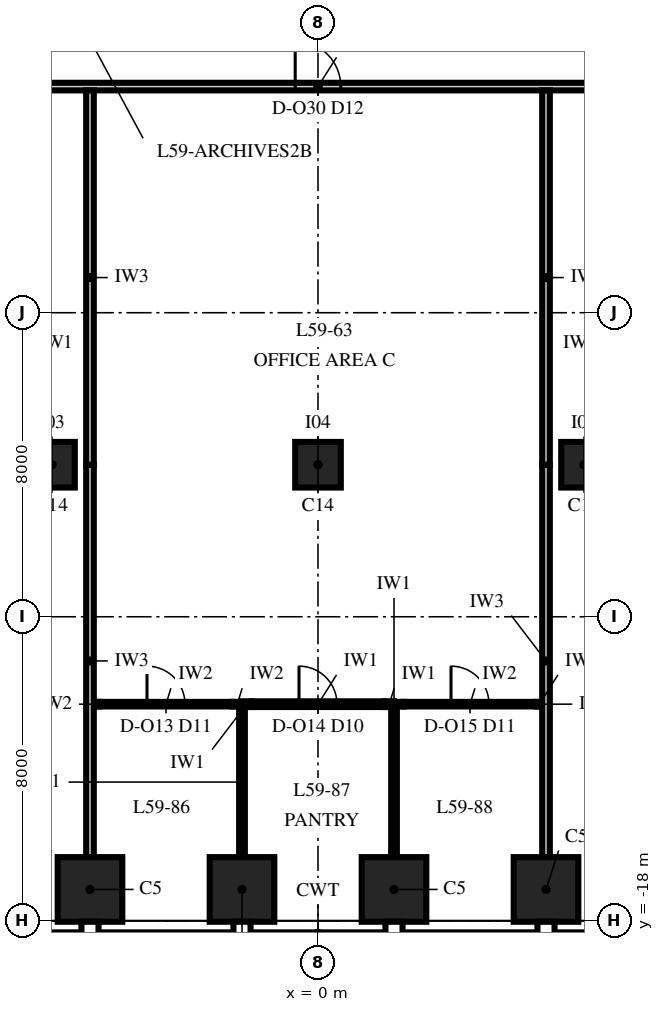
"""IFC4 building model, lengths in metres.
Left out: names, types, materials, properties, quantities, classifications, styles, units other than length and angle.
Written with IfcOpenShell. Run it as: python <this file> out.ifc"""

import sys

from ifc_helpers import new_model, si_unit, direction, frame, frame_2d, origin, origin_2d, place, context, subcontext, project, spatial, rectangle, extrude, element, fill, save


model = new_model("IFC4")
c1 = context("Model", 3, precision=1e-05, world=origin(), true_north=direction((0.0, 1.0)))
c2 = subcontext(c1, "Body", "Model", "MODEL_VIEW")
j1 = project(units=[si_unit("LENGTHUNIT", "METRE"), si_unit("PLANEANGLEUNIT", "RADIAN")], contexts=[c1])
p1 = place(None, origin())
s1 = spatial("IfcSite", under=j1, at=p1, CompositionType="ELEMENT")
p2 = place(p1, origin())
s2 = spatial("IfcBuilding", under=s1, at=p2, CompositionType="ELEMENT")
p3 = place(p2, frame((0.0, 0.0, 256.0)))
s3 = spatial("IfcBuildingStorey", under=s2, at=p3, CompositionType="ELEMENT", Elevation=256.0)
for number, where, z_axis, x_axis in (
    (1, (-6.0, -17.175, 0.0), (0.0, 0.0, 1.0), (1.0, 0.0, 0.0)),
    (2, (-2.0, -17.175, 0.0), (0.0, 0.0, 1.0), (1.0, 0.0, 0.0)),
    (3, (2.0, -17.175, 0.0), (0.0, 0.0, 1.0), (1.0, 0.0, 0.0)),
    (4, (6.0, -17.175, 0.0), (0.0, 0.0, 1.0), (1.0, 0.0, 0.0)),
):
    element("IfcColumn", number, at=place(p3, frame(where, z_axis=z_axis, x_axis=x_axis)), inside=s3, PredefinedType="COLUMN", context=c2, shape_type="SweptSolid", body=[
        extrude(rectangle(XDim=1.7, YDim=1.7, at=origin_2d()), origin(), (0.0, 0.0, 1.0), 3.75),
    ])
for number, where, z_axis, x_axis in (
    (5, (-7.0, -6.0, 0.0), (0.0, 0.0, 1.0), (1.0, 0.0, 0.0)),
    (6, (0.0, -6.0, 0.0), (0.0, 0.0, 1.0), (1.0, 0.0, 0.0)),
    (7, (7.0, -6.0, 0.0), (0.0, 0.0, 1.0), (1.0, 0.0, 0.0)),
):
    element("IfcColumn", number, at=place(p3, frame(where, z_axis=z_axis, x_axis=x_axis)), inside=s3, PredefinedType="COLUMN", context=c2, shape_type="SweptSolid", body=[
        extrude(rectangle(XDim=1.2, YDim=1.2, at=origin_2d()), origin(), (0.0, 0.0, 1.0), 4.0),
    ])
p4 = place(p3, frame((-5.9, -12.3, 0.0), z_axis=(0.0, 0.0, 1.0), x_axis=(1.0, 0.0, 0.0)))
e8 = element("IfcWall", 8, at=p4, inside=s3, PredefinedType="PARTITIONING", context=c2, shape_type="SweptSolid", body=[
    extrude(rectangle(XDim=0.15, YDim=0.12, at=frame_2d((0.075, 0.0))), origin(), (0.0, 0.0, 1.0), 2.15),
])
p5 = place(p3, frame((-5.75, -12.3, 0.0), z_axis=(0.0, 0.0, 1.0), x_axis=(1.0, 0.0, 0.0)))
e9 = element("IfcWall", 9, at=p5, inside=s3, PredefinedType="PARTITIONING", context=c2, shape_type="SweptSolid", body=[
    extrude(rectangle(XDim=3.5, YDim=0.12, at=frame_2d((1.75, 0.0))), origin(), (0.0, 0.0, 1.0), 3.85),
])
p6 = place(p5, frame((1.25, 0.0, 0.0)))
e10 = element("IfcOpeningElement", 10, at=p6, cuts=e9, PredefinedType="OPENING", context=c2, shape_type="SweptSolid", body=[
    extrude(rectangle(XDim=1.0, YDim=2.4, at=frame_2d((0.5, 1.2))), frame((0.0, 0.075, 0.0), z_axis=(0.0, -1.0, 0.0), x_axis=(1.0, 0.0, 0.0)), (0.0, 0.0, 1.0), 0.15),
])
p7 = place(p3, frame((-2.25, -12.3, 0.0), z_axis=(0.0, 0.0, 1.0), x_axis=(1.0, 0.0, 0.0)))
e11 = element("IfcWall", 11, at=p7, inside=s3, PredefinedType="PARTITIONING", context=c2, shape_type="SweptSolid", body=[
    extrude(rectangle(XDim=0.25, YDim=0.12, at=frame_2d((0.125, 0.0))), origin(), (0.0, 0.0, 1.0), 2.15),
])
p8 = place(p3, frame((-2.0, -12.3, 0.0), z_axis=(0.0, 0.0, 1.0), x_axis=(1.0, 0.0, 0.0)))
e12 = element("IfcWall", 12, at=p8, inside=s3, PredefinedType="PARTITIONING", context=c2, shape_type="SweptSolid", body=[
    extrude(rectangle(XDim=0.25, YDim=0.15, at=frame_2d((0.125, 0.0))), origin(), (0.0, 0.0, 1.0), 2.15),
])
p9 = place(p3, frame((-1.75, -12.3, 0.0), z_axis=(0.0, 0.0, 1.0), x_axis=(1.0, 0.0, 0.0)))
e13 = element("IfcWall", 13, at=p9, inside=s3, PredefinedType="PARTITIONING", context=c2, shape_type="SweptSolid", body=[
    extrude(rectangle(XDim=3.5, YDim=0.15, at=frame_2d((1.75, 0.0))), origin(), (0.0, 0.0, 1.0), 3.85),
])
p10 = place(p9, frame((1.25, 0.0, 0.0)))
e14 = element("IfcOpeningElement", 14, at=p10, cuts=e13, PredefinedType="OPENING", context=c2, shape_type="SweptSolid", body=[
    extrude(rectangle(XDim=1.0, YDim=2.3, at=frame_2d((0.5, 1.15))), frame((0.0, 0.09, 0.0), z_axis=(0.0, -1.0, 0.0), x_axis=(1.0, 0.0, 0.0)), (0.0, 0.0, 1.0), 0.18),
])
p11 = place(p3, frame((1.75, -12.3, 0.0), z_axis=(0.0, 0.0, 1.0), x_axis=(1.0, 0.0, 0.0)))
e15 = element("IfcWall", 15, at=p11, inside=s3, PredefinedType="PARTITIONING", context=c2, shape_type="SweptSolid", body=[
    extrude(rectangle(XDim=0.25, YDim=0.15, at=frame_2d((0.125, 0.0))), origin(), (0.0, 0.0, 1.0), 2.15),
])
p12 = place(p3, frame((2.0, -12.3, 0.0), z_axis=(0.0, 0.0, 1.0), x_axis=(1.0, 0.0, 0.0)))
e16 = element("IfcWall", 16, at=p12, inside=s3, PredefinedType="PARTITIONING", context=c2, shape_type="SweptSolid", body=[
    extrude(rectangle(XDim=0.25, YDim=0.12, at=frame_2d((0.125, 0.0))), origin(), (0.0, 0.0, 1.0), 2.15),
])
p13 = place(p3, frame((2.25, -12.3, 0.0), z_axis=(0.0, 0.0, 1.0), x_axis=(1.0, 0.0, 0.0)))
e17 = element("IfcWall", 17, at=p13, inside=s3, PredefinedType="PARTITIONING", context=c2, shape_type="SweptSolid", body=[
    extrude(rectangle(XDim=3.5, YDim=0.12, at=frame_2d((1.75, 0.0))), origin(), (0.0, 0.0, 1.0), 3.85),
])
p14 = place(p13, frame((1.25, 0.0, 0.0)))
e18 = element("IfcOpeningElement", 18, at=p14, cuts=e17, PredefinedType="OPENING", context=c2, shape_type="SweptSolid", body=[
    extrude(rectangle(XDim=1.0, YDim=2.4, at=frame_2d((0.5, 1.2))), frame((0.0, 0.075, 0.0), z_axis=(0.0, -1.0, 0.0), x_axis=(1.0, 0.0, 0.0)), (0.0, 0.0, 1.0), 0.15),
])
p15 = place(p3, frame((5.75, -12.3, 0.0), z_axis=(0.0, 0.0, 1.0), x_axis=(1.0, 0.0, 0.0)))
e19 = element("IfcWall", 19, at=p15, inside=s3, PredefinedType="PARTITIONING", context=c2, shape_type="SweptSolid", body=[
    extrude(rectangle(XDim=0.15, YDim=0.12, at=frame_2d((0.075, 0.0))), origin(), (0.0, 0.0, 1.0), 2.15),
])
p16 = place(p3, frame((-15.95, 3.95, 0.0), z_axis=(0.0, 0.0, 1.0), x_axis=(1.0, 0.0, 0.0)))
e20 = element("IfcWall", 20, at=p16, inside=s3, PredefinedType="PARTITIONING", context=c2, shape_type="SweptSolid", body=[
    extrude(rectangle(XDim=31.9, YDim=0.2, at=frame_2d((15.95, 0.0))), origin(), (0.0, 0.0, 1.0), 3.23),
])
p17 = place(p16, frame((3.35, 0.0, 0.0)))
e21 = element("IfcOpeningElement", 21, at=p17, cuts=e20, PredefinedType="OPENING", context=c2, shape_type="SweptSolid", body=[
    extrude(rectangle(XDim=1.2, YDim=2.4, at=frame_2d((0.6, 1.2))), frame((0.0, 0.115, 0.0), z_axis=(0.0, -1.0, 0.0), x_axis=(1.0, 0.0, 0.0)), (0.0, 0.0, 1.0), 0.23),
])
p18 = place(p16, frame((27.35, 0.0, 0.0)))
e22 = element("IfcOpeningElement", 22, at=p18, cuts=e20, PredefinedType="OPENING", context=c2, shape_type="SweptSolid", body=[
    extrude(rectangle(XDim=1.2, YDim=2.4, at=frame_2d((0.6, 1.2))), frame((0.0, 0.115, 0.0), z_axis=(0.0, -1.0, 0.0), x_axis=(1.0, 0.0, 0.0)), (0.0, 0.0, 1.0), 0.23),
])
p19 = place(p16, frame((15.35, 0.0, 0.0)))
e23 = element("IfcOpeningElement", 23, at=p19, cuts=e20, PredefinedType="OPENING", context=c2, shape_type="SweptSolid", body=[
    extrude(rectangle(XDim=1.2, YDim=2.4, at=frame_2d((0.6, 1.2))), frame((0.0, 0.115, 0.0), z_axis=(0.0, -1.0, 0.0), x_axis=(1.0, 0.0, 0.0)), (0.0, 0.0, 1.0), 0.23),
])
p20 = place(p3, frame((-6.0, -16.325, 0.0), z_axis=(0.0, 0.0, 1.0), x_axis=(0.0, 1.0, 0.0)))
e24 = element("IfcWall", 24, at=p20, inside=s3, PredefinedType="PARTITIONING", context=c2, shape_type="SweptSolid", body=[
    extrude(rectangle(XDim=10.325, YDim=0.2, at=frame_2d((5.163, 0.0))), origin(), (0.0, 0.0, 1.0), 2.15),
])
p21 = place(p3, frame((-6.0, -6.0, 0.0), z_axis=(0.0, 0.0, 1.0), x_axis=(0.0, 1.0, 0.0)))
e25 = element("IfcWall", 25, at=p21, inside=s3, PredefinedType="PARTITIONING", context=c2, shape_type="SweptSolid", body=[
    extrude(rectangle(XDim=9.85, YDim=0.2, at=frame_2d((4.925, 0.0))), origin(), (0.0, 0.0, 1.0), 2.85),
])
for number, where, z_axis, x_axis in (
    (26, (-2.0, -16.325, 0.0), (0.0, 0.0, 1.0), (0.0, 1.0, 0.0)),
    (27, (2.0, -16.325, 0.0), (0.0, 0.0, 1.0), (0.0, 1.0, 0.0)),
):
    element("IfcWall", number, at=place(p3, frame(where, z_axis=z_axis, x_axis=x_axis)), inside=s3, PredefinedType="PARTITIONING", context=c2, shape_type="SweptSolid", body=[
        extrude(rectangle(XDim=3.95, YDim=0.15, at=frame_2d((1.975, 0.0))), origin(), (0.0, 0.0, 1.0), 2.15),
    ])
p22 = place(p3, frame((6.0, -16.325, 0.0), z_axis=(0.0, 0.0, 1.0), x_axis=(0.0, 1.0, 0.0)))
e28 = element("IfcWall", 28, at=p22, inside=s3, PredefinedType="PARTITIONING", context=c2, shape_type="SweptSolid", body=[
    extrude(rectangle(XDim=10.325, YDim=0.2, at=frame_2d((5.163, 0.0))), origin(), (0.0, 0.0, 1.0), 2.15),
])
p23 = place(p3, frame((6.0, -6.0, 0.0), z_axis=(0.0, 0.0, 1.0), x_axis=(0.0, 1.0, 0.0)))
e29 = element("IfcWall", 29, at=p23, inside=s3, PredefinedType="PARTITIONING", context=c2, shape_type="SweptSolid", body=[
    extrude(rectangle(XDim=9.85, YDim=0.2, at=frame_2d((4.925, 0.0))), origin(), (0.0, 0.0, 1.0), 2.85),
])
p24 = place(p6, origin())
e30 = element("IfcDoor", 30, at=p24, inside=s3, OperationType="SINGLE_SWING_RIGHT", PredefinedType="DOOR", context=c2, shape_type="SweptSolid", body=[
    extrude(rectangle(XDim=1.0, YDim=2.4, at=frame_2d((0.5, 1.2))), frame((0.0, 0.06, 0.0), z_axis=(0.0, -1.0, 0.0), x_axis=(1.0, 0.0, 0.0)), (0.0, 0.0, 1.0), 0.12),
])
fill(e10, e30)
p25 = place(p10, origin())
e31 = element("IfcDoor", 31, at=p25, inside=s3, OperationType="SINGLE_SWING_LEFT", PredefinedType="DOOR", context=c2, shape_type="SweptSolid", body=[
    extrude(rectangle(XDim=1.0, YDim=2.3, at=frame_2d((0.5, 1.15))), frame((0.0, 0.075, 0.0), z_axis=(0.0, -1.0, 0.0), x_axis=(1.0, 0.0, 0.0)), (0.0, 0.0, 1.0), 0.149),
])
fill(e14, e31)
p26 = place(p14, origin())
e32 = element("IfcDoor", 32, at=p26, inside=s3, OperationType="SINGLE_SWING_RIGHT", PredefinedType="DOOR", context=c2, shape_type="SweptSolid", body=[
    extrude(rectangle(XDim=1.0, YDim=2.4, at=frame_2d((0.5, 1.2))), frame((0.0, 0.06, 0.0), z_axis=(0.0, -1.0, 0.0), x_axis=(1.0, 0.0, 0.0)), (0.0, 0.0, 1.0), 0.12),
])
fill(e18, e32)
p27 = place(p19, origin())
e33 = element("IfcDoor", 33, at=p27, inside=s3, OperationType="SINGLE_SWING_LEFT", PredefinedType="DOOR", context=c2, shape_type="SweptSolid", body=[
    extrude(rectangle(XDim=1.2, YDim=2.4, at=frame_2d((0.6, 1.2))), frame((0.0, 0.1, 0.0), z_axis=(0.0, -1.0, 0.0), x_axis=(1.0, 0.0, 0.0)), (0.0, 0.0, 1.0), 0.199),
])
fill(e23, e33)
save(model, sys.argv[1])
